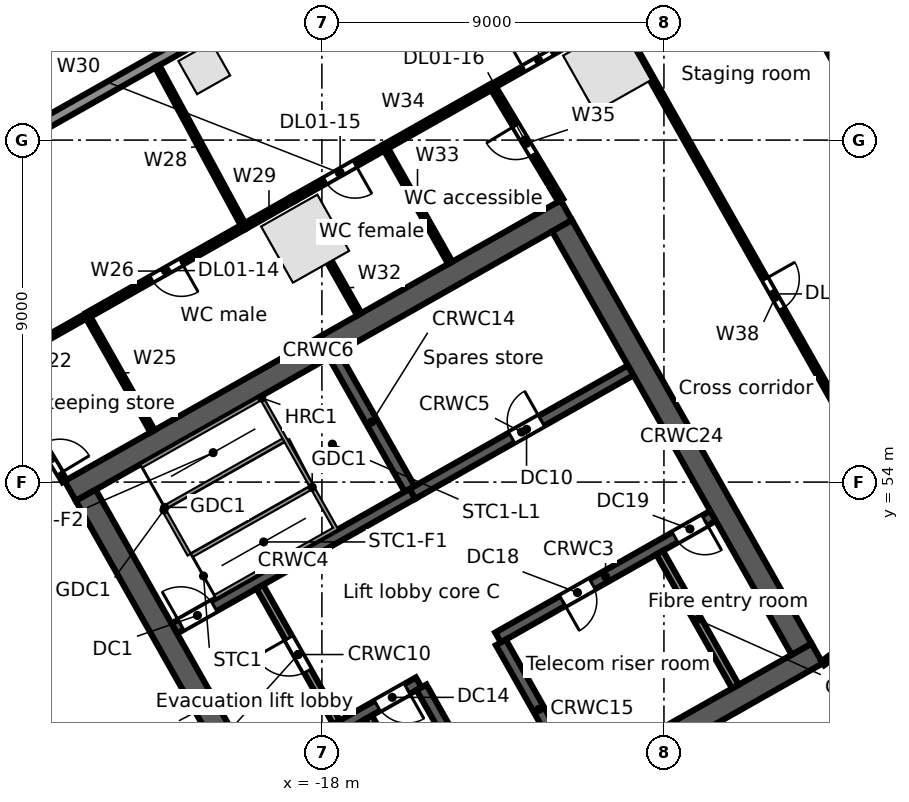
"""IFC4 building model, lengths in metres.
Left out: names, types, materials, properties, quantities, classifications, styles, units other than length and angle.
Written with IfcOpenShell. Run it as: python <this file> out.ifc"""

import sys

from ifc_helpers import new_model, si_unit, direction, frame, frame_2d, origin, origin_2d, place, context, subcontext, project, spatial, rectangle, extrude, element, fill, save


model = new_model("IFC4")
c1 = context("Model", 3, precision=1e-05, world=origin(), true_north=direction((0.0, 1.0)))
c2 = subcontext(c1, "Body", "Model", "MODEL_VIEW")
j1 = project(units=[si_unit("LENGTHUNIT", "METRE"), si_unit("PLANEANGLEUNIT", "RADIAN")], contexts=[c1])
p1 = place(None, origin())
s1 = spatial("IfcSite", under=j1, at=p1, CompositionType="ELEMENT")
p2 = place(p1, origin())
s2 = spatial("IfcBuilding", under=s1, at=p2, CompositionType="ELEMENT")
p3 = place(p2, frame((0.0, 0.0, 6.5)))
s3 = spatial("IfcBuildingStorey", under=s2, at=p3, CompositionType="ELEMENT", Elevation=6.5)
for number, where, z_axis, x_axis in (
    (1, (-10.495, 64.902, 0.0), (0.0, 0.0, 1.0), (-0.87, -0.492, 0.0)),
    (2, (-18.441, 60.406, 0.0), (0.0, 0.0, 1.0), (-0.87, -0.492, 0.0)),
):
    element("IfcColumn", number, at=place(p3, frame(where, z_axis=z_axis, x_axis=x_axis)), inside=s3, PredefinedType="COLUMN", context=c2, shape_type="SweptSolid", body=[
        extrude(rectangle(XDim=1.7, YDim=1.7, at=origin_2d()), origin(), (0.0, 0.0, 1.0), 5.0),
    ])
p4 = place(p3, frame((-21.096, 64.89, 0.0), z_axis=(0.0, 0.0, 1.0), x_axis=(-0.87035569594, -0.492423560103, 0.0)))
e3 = element("IfcColumn", 3, at=p4, inside=s3, PredefinedType="COLUMN", context=c2, shape_type="SweptSolid", body=[
    extrude(rectangle(XDim=1.0, YDim=1.0, at=origin_2d()), origin(), (0.0, 0.0, 1.0), 5.0),
])
p5 = place(p3, frame((-63.707, 41.701, 0.0), z_axis=(0.0, 0.0, 1.0), x_axis=(0.870355510268, 0.492423888277, 0.0)))
e4 = element("IfcWall", 4, at=p5, inside=s3, PredefinedType="STANDARD", context=c2, shape_type="SweptSolid", body=[
    extrude(rectangle(XDim=67.903, YDim=0.3, at=frame_2d((33.952, 0.0))), origin(), (0.0, 0.0, 1.0), 4.65),
])
p6 = place(p3, frame((-18.024, 42.104, 0.0), z_axis=(0.0, 0.0, 1.0), x_axis=(0.870360574057, 0.492414937962, 0.0)))
e5 = element("IfcWall", 5, at=p6, inside=s3, PredefinedType="SOLIDWALL", context=c2, shape_type="SweptSolid", body=[
    extrude(rectangle(XDim=15.0, YDim=0.6, at=frame_2d((7.5, 0.0))), origin(), (0.0, 0.0, 1.0), 4.65),
])
p7 = place(p6, frame((6.1, 0.0, 0.0)))
e6 = element("IfcOpeningElement", 6, at=p7, cuts=e5, PredefinedType="OPENING", context=c2, shape_type="SweptSolid", body=[
    extrude(rectangle(XDim=1.2, YDim=2.1, at=frame_2d((0.6, 1.05))), frame((0.0, 0.31, 0.0), z_axis=(0.0, -1.0, 0.0), x_axis=(1.0, 0.0, 0.0)), (0.0, 0.0, 1.0), 0.62),
])
p8 = place(p3, frame((-19.718, 46.316, 0.0), z_axis=(0.0, 0.0, 1.0), x_axis=(0.870353963862, 0.492426621528, 0.0)))
e7 = element("IfcWall", 7, at=p8, inside=s3, PredefinedType="SOLIDWALL", context=c2, shape_type="SweptSolid", body=[
    extrude(rectangle(XDim=4.9, YDim=0.3, at=frame_2d((2.45, 0.0))), origin(), (0.0, 0.0, 1.0), 4.65),
])
p9 = place(p8, frame((0.55, 0.0, 0.0)))
e8 = element("IfcOpeningElement", 8, at=p9, cuts=e7, PredefinedType="OPENING", context=c2, shape_type="SweptSolid", body=[
    extrude(rectangle(XDim=1.1, YDim=2.1, at=frame_2d((0.55, 1.05))), frame((0.0, 0.16, 0.0), z_axis=(0.0, -1.0, 0.0), x_axis=(1.0, 0.0, 0.0)), (0.0, 0.0, 1.0), 0.32),
])
p10 = place(p8, frame((3.65, 0.0, 0.0)))
e9 = element("IfcOpeningElement", 9, at=p10, cuts=e7, PredefinedType="OPENING", context=c2, shape_type="SweptSolid", body=[
    extrude(rectangle(XDim=0.9, YDim=2.1, at=frame_2d((0.45, 1.05))), frame((0.0, 0.16, 0.0), z_axis=(0.0, -1.0, 0.0), x_axis=(1.0, 0.0, 0.0)), (0.0, 0.0, 1.0), 0.32),
])
p11 = place(p3, frame((-13.365, 49.911, 0.0), z_axis=(0.0, 0.0, 1.0), x_axis=(0.870340995471, 0.49244954219, 0.0)))
e10 = element("IfcWall", 10, at=p11, inside=s3, PredefinedType="SOLIDWALL", context=c2, shape_type="SweptSolid", body=[
    extrude(rectangle(XDim=6.5, YDim=0.3, at=frame_2d((3.25, 0.0))), origin(), (0.0, 0.0, 1.0), 4.65),
])
p12 = place(p11, frame((1.95, 0.0, 0.0)))
e11 = element("IfcOpeningElement", 11, at=p12, cuts=e10, PredefinedType="OPENING", context=c2, shape_type="SweptSolid", body=[
    extrude(rectangle(XDim=0.9, YDim=2.1, at=frame_2d((0.45, 1.05))), frame((0.0, 0.16, 0.0), z_axis=(0.0, -1.0, 0.0), x_axis=(1.0, 0.0, 0.0)), (0.0, 0.0, 1.0), 0.32),
])
p13 = place(p11, frame((5.35, 0.0, 0.0)))
e12 = element("IfcOpeningElement", 12, at=p13, cuts=e10, PredefinedType="OPENING", context=c2, shape_type="SweptSolid", body=[
    extrude(rectangle(XDim=0.9, YDim=2.1, at=frame_2d((0.45, 1.05))), frame((0.0, 0.16, 0.0), z_axis=(0.0, -1.0, 0.0), x_axis=(1.0, 0.0, 0.0)), (0.0, 0.0, 1.0), 0.32),
])
p14 = place(p3, frame((-21.885, 50.146, 0.0), z_axis=(0.0, 0.0, 1.0), x_axis=(0.870359411463, 0.492416992881, 0.0)))
e13 = element("IfcWall", 13, at=p14, inside=s3, PredefinedType="SOLIDWALL", context=c2, shape_type="SweptSolid", body=[
    extrude(rectangle(XDim=7.2, YDim=0.3, at=frame_2d((3.6, 0.0))), origin(), (0.0, 0.0, 1.0), 4.65),
])
p15 = place(p14, frame((0.2, 0.0, 0.0)))
e14 = element("IfcOpeningElement", 14, at=p15, cuts=e13, PredefinedType="OPENING", context=c2, shape_type="SweptSolid", body=[
    extrude(rectangle(XDim=1.0, YDim=2.1, at=frame_2d((0.5, 1.05))), frame((0.0, 0.16, 0.0), z_axis=(0.0, -1.0, 0.0), x_axis=(1.0, 0.0, 0.0)), (0.0, 0.0, 1.0), 0.32),
])
p16 = place(p3, frame((-15.618, 53.691, 0.0), z_axis=(0.0, 0.0, 1.0), x_axis=(0.870356769198, 0.492421663121, 0.0)))
e15 = element("IfcWall", 15, at=p16, inside=s3, PredefinedType="SOLIDWALL", context=c2, shape_type="SweptSolid", body=[
    extrude(rectangle(XDim=6.6, YDim=0.3, at=frame_2d((3.3, 0.0))), origin(), (0.0, 0.0, 1.0), 4.65),
])
p17 = place(p16, frame((3.0, 0.0, 0.0)))
e16 = element("IfcOpeningElement", 16, at=p17, cuts=e15, PredefinedType="OPENING", context=c2, shape_type="SweptSolid", body=[
    extrude(rectangle(XDim=0.9, YDim=2.1, at=frame_2d((0.45, 1.05))), frame((0.0, 0.16, 0.0), z_axis=(0.0, -1.0, 0.0), x_axis=(1.0, 0.0, 0.0)), (0.0, 0.0, 1.0), 0.32),
])
p18 = place(p3, frame((-24.623, 53.767, 0.0), z_axis=(0.0, 0.0, 1.0), x_axis=(0.870356627484, 0.492421913601, 0.0)))
e17 = element("IfcWall", 17, at=p18, inside=s3, PredefinedType="SOLIDWALL", context=c2, shape_type="SweptSolid", body=[
    extrude(rectangle(XDim=15.0, YDim=0.6, at=frame_2d((7.5, 0.0))), origin(), (0.0, 0.0, 1.0), 4.65),
])
p19 = place(p3, frame((-24.214, 53.654, 0.0), z_axis=(0.0, 0.0, 1.0), x_axis=(0.492441221355, -0.870345703448, 0.0)))
e18 = element("IfcWall", 18, at=p19, inside=s3, PredefinedType="SOLIDWALL", context=c2, shape_type="SweptSolid", body=[
    extrude(rectangle(XDim=12.8, YDim=0.6, at=frame_2d((6.4, 0.0))), origin(), (0.0, 0.0, 1.0), 4.65),
])
p20 = place(p3, frame((-19.635, 51.246, 0.0), z_axis=(0.0, 0.0, 1.0), x_axis=(0.492408451753, -0.87036424366, 0.0)))
e19 = element("IfcWall", 19, at=p20, inside=s3, PredefinedType="PARTITIONING", context=c2, shape_type="SweptSolid", body=[
    extrude(rectangle(XDim=4.1, YDim=0.2, at=frame_2d((2.05, 0.0))), origin(), (0.0, 0.0, 1.0), 4.65),
])
p21 = place(p20, frame((1.55, 0.0, 0.0)))
e20 = element("IfcOpeningElement", 20, at=p21, cuts=e19, PredefinedType="OPENING", context=c2, shape_type="SweptSolid", body=[
    extrude(rectangle(XDim=1.0, YDim=2.1, at=frame_2d((0.5, 1.05))), frame((0.0, 0.11, 0.0), z_axis=(0.0, -1.0, 0.0), x_axis=(1.0, 0.0, 0.0)), (0.0, 0.0, 1.0), 0.22),
])
p22 = place(p3, frame((-16.772, 47.811, 0.0), z_axis=(0.0, 0.0, 1.0), x_axis=(0.492440575896, -0.870346068648, 0.0)))
e21 = element("IfcWall", 21, at=p22, inside=s3, PredefinedType="SOLIDWALL", context=c2, shape_type="SweptSolid", body=[
    extrude(rectangle(XDim=4.05, YDim=0.2, at=frame_2d((2.025, 0.0))), origin(), (0.0, 0.0, 1.0), 4.65),
])
p23 = place(p3, frame((-15.379, 48.599, 0.0), z_axis=(0.0, 0.0, 1.0), x_axis=(0.492394910396, -0.870371904542, 0.0)))
e22 = element("IfcWall", 22, at=p23, inside=s3, PredefinedType="SOLIDWALL", context=c2, shape_type="SweptSolid", body=[
    extrude(rectangle(XDim=4.05, YDim=0.3, at=frame_2d((2.025, 0.0))), origin(), (0.0, 0.0, 1.0), 4.65),
])
p24 = place(p3, frame((-17.686, 57.347, 0.0), z_axis=(0.0, 0.0, 1.0), x_axis=(0.492420746998, -0.870357287513, 0.0)))
e23 = element("IfcWall", 23, at=p24, inside=s3, PredefinedType="SOLIDWALL", context=c2, shape_type="SweptSolid", body=[
    extrude(rectangle(XDim=4.05, YDim=0.3, at=frame_2d((2.025, 0.0))), origin(), (0.0, 0.0, 1.0), 4.65),
])
p25 = place(p3, frame((-13.291, 49.781, 0.0), z_axis=(0.0, 0.0, 1.0), x_axis=(0.492394910396, -0.870371904542, 0.0)))
e24 = element("IfcWall", 24, at=p25, inside=s3, PredefinedType="SOLIDWALL", context=c2, shape_type="SweptSolid", body=[
    extrude(rectangle(XDim=4.05, YDim=0.3, at=frame_2d((2.025, 0.0))), origin(), (0.0, 0.0, 1.0), 4.65),
])
p26 = place(p3, frame((-9.113, 52.144, 0.0), z_axis=(0.0, 0.0, 1.0), x_axis=(0.492394910396, -0.870371904542, 0.0)))
e25 = element("IfcWall", 25, at=p26, inside=s3, PredefinedType="PARTITIONING", context=c2, shape_type="SweptSolid", body=[
    extrude(rectangle(XDim=4.05, YDim=0.2, at=frame_2d((2.025, 0.0))), origin(), (0.0, 0.0, 1.0), 4.65),
])
p27 = place(p3, frame((-11.681, 60.744, 0.0), z_axis=(0.0, 0.0, 1.0), x_axis=(0.492426772896, -0.870353878221, 0.0)))
e26 = element("IfcWall", 26, at=p27, inside=s3, PredefinedType="SOLIDWALL", context=c2, shape_type="SweptSolid", body=[
    extrude(rectangle(XDim=12.8, YDim=0.6, at=frame_2d((6.4, 0.0))), origin(), (0.0, 0.0, 1.0), 4.65),
])
p28 = place(p3, frame((-26.573, 57.03, 0.0), z_axis=(0.0, 0.0, 1.0), x_axis=(0.870344460795, 0.492443417626, 0.0)))
e27 = element("IfcWall", 27, at=p28, inside=s3, PredefinedType="PARTITIONING", context=c2, shape_type="SweptSolid", body=[
    extrude(rectangle(XDim=2.75, YDim=0.125, at=frame_2d((1.375, 0.0))), origin(), (0.0, 0.0, 1.0), 4.65),
])
p29 = place(p3, frame((-25.587, 55.387, 0.0), z_axis=(0.0, 0.0, 1.0), x_axis=(0.514767546849, -0.857329792268, 0.0)))
e28 = element("IfcWall", 28, at=p29, inside=s3, PredefinedType="PARTITIONING", context=c2, shape_type="SweptSolid", body=[
    extrude(rectangle(XDim=1.585, YDim=0.125, at=frame_2d((0.792, 0.0))), origin(), (0.0, 0.0, 1.0), 4.65),
])
p30 = place(p29, frame((0.45, 0.0, 0.0)))
e29 = element("IfcOpeningElement", 29, at=p30, cuts=e28, PredefinedType="OPENING", context=c2, shape_type="SweptSolid", body=[
    extrude(rectangle(XDim=0.9, YDim=2.1, at=frame_2d((0.45, 1.05))), frame((0.0, 0.073, 0.0), z_axis=(0.0, -1.0, 0.0), x_axis=(1.0, 0.0, 0.0)), (0.0, 0.0, 1.0), 0.145),
])
p31 = place(p3, frame((-24.18, 58.384, 0.0), z_axis=(0.0, 0.0, 1.0), x_axis=(0.492521469645, -0.870300294116, 0.0)))
e30 = element("IfcWall", 30, at=p31, inside=s3, PredefinedType="PARTITIONING", context=c2, shape_type="SweptSolid", body=[
    extrude(rectangle(XDim=3.5, YDim=0.125, at=frame_2d((1.75, 0.0))), origin(), (0.0, 0.0, 1.0), 3.93),
])
p32 = place(p3, frame((-24.18, 58.384, 0.0), z_axis=(0.0, 0.0, 1.0), x_axis=(0.870360772617, 0.492414587, 0.0)))
e31 = element("IfcWall", 31, at=p32, inside=s3, PredefinedType="PARTITIONING", context=c2, shape_type="SweptSolid", body=[
    extrude(rectangle(XDim=4.75, YDim=0.15, at=frame_2d((2.375, 0.0))), origin(), (0.0, 0.0, 1.0), 4.65),
])
p33 = place(p32, frame((1.95, 0.0, 0.0)))
e32 = element("IfcOpeningElement", 32, at=p33, cuts=e31, PredefinedType="OPENING", context=c2, shape_type="SweptSolid", body=[
    extrude(rectangle(XDim=0.9, YDim=2.1, at=frame_2d((0.45, 1.05))), frame((0.0, 0.085, 0.0), z_axis=(0.0, -1.0, 0.0), x_axis=(1.0, 0.0, 0.0)), (0.0, 0.0, 1.0), 0.17),
])
p34 = place(p3, frame((-22.33, 64.939, 0.0), z_axis=(0.0, 0.0, 1.0), x_axis=(0.476360236723, -0.879250206067, 0.0)))
e33 = element("IfcWall", 33, at=p34, inside=s3, PredefinedType="PARTITIONING", context=c2, shape_type="SweptSolid", body=[
    extrude(rectangle(XDim=4.795, YDim=0.125, at=frame_2d((2.397, 0.0))), origin(), (0.0, 0.0, 1.0), 3.93),
])
p35 = place(p3, frame((-20.046, 60.723, 0.0), z_axis=(0.0, 0.0, 1.0), x_axis=(0.870308175411, 0.492507542899, 0.0)))
e34 = element("IfcWall", 34, at=p35, inside=s3, PredefinedType="PARTITIONING", context=c2, shape_type="SweptSolid", body=[
    extrude(rectangle(XDim=1.5, YDim=0.15, at=frame_2d((0.75, 0.0))), origin(), (0.0, 0.0, 1.0), 3.93),
])
p36 = place(p3, frame((-18.74, 61.462, 0.0), z_axis=(0.0, 0.0, 1.0), x_axis=(0.870430549821, 0.492291232848, 0.0)))
e35 = element("IfcWall", 35, at=p36, inside=s3, PredefinedType="PARTITIONING", context=c2, shape_type="SweptSolid", body=[
    extrude(rectangle(XDim=2.75, YDim=0.15, at=frame_2d((1.375, 0.0))), origin(), (0.0, 0.0, 1.0), 4.65),
])
p37 = place(p36, frame((0.95, 0.0, 0.0)))
e36 = element("IfcOpeningElement", 36, at=p37, cuts=e35, PredefinedType="OPENING", context=c2, shape_type="SweptSolid", body=[
    extrude(rectangle(XDim=0.9, YDim=2.1, at=frame_2d((0.45, 1.05))), frame((0.0, 0.085, 0.0), z_axis=(0.0, -1.0, 0.0), x_axis=(1.0, 0.0, 0.0)), (0.0, 0.0, 1.0), 0.17),
])
p38 = place(p3, frame((-17.797, 59.794, 0.0), z_axis=(0.0, 0.0, 1.0), x_axis=(0.492366981934, -0.870387703901, 0.0)))
e37 = element("IfcWall", 37, at=p38, inside=s3, PredefinedType="PARTITIONING", context=c2, shape_type="SweptSolid", body=[
    extrude(rectangle(XDim=1.584, YDim=0.125, at=frame_2d((0.792, 0.0))), origin(), (0.0, 0.0, 1.0), 4.65),
])
p39 = place(p3, frame((-16.346, 62.816, 0.0), z_axis=(0.0, 0.0, 1.0), x_axis=(0.492220429283, -0.870470590541, 0.0)))
e38 = element("IfcWall", 38, at=p39, inside=s3, PredefinedType="PARTITIONING", context=c2, shape_type="SweptSolid", body=[
    extrude(rectangle(XDim=3.5, YDim=0.125, at=frame_2d((1.75, 0.0))), origin(), (0.0, 0.0, 1.0), 3.93),
])
p40 = place(p3, frame((-16.346, 62.816, 0.0), z_axis=(0.0, 0.0, 1.0), x_axis=(0.870334637055, 0.492460779699, 0.0)))
e39 = element("IfcWall", 39, at=p40, inside=s3, PredefinedType="PARTITIONING", context=c2, shape_type="SweptSolid", body=[
    extrude(rectangle(XDim=3.249, YDim=0.15, at=frame_2d((1.625, 0.0))), origin(), (0.0, 0.0, 1.0), 4.65),
])
p41 = place(p3, frame((-13.518, 64.416, 0.0), z_axis=(0.0, 0.0, 1.0), x_axis=(0.514875058642, -0.857265229663, 0.0)))
e40 = element("IfcWall", 40, at=p41, inside=s3, PredefinedType="PARTITIONING", context=c2, shape_type="SweptSolid", body=[
    extrude(rectangle(XDim=3.502, YDim=0.15, at=frame_2d((1.751, 0.0))), origin(), (0.0, 0.0, 1.0), 3.93),
])
p42 = place(p41, frame((1.2, 0.0, 0.0)))
e41 = element("IfcOpeningElement", 41, at=p42, cuts=e40, PredefinedType="OPENING", context=c2, shape_type="SweptSolid", body=[
    extrude(rectangle(XDim=0.9, YDim=2.1, at=frame_2d((0.45, 1.05))), frame((0.0, 0.085, 0.0), z_axis=(0.0, -1.0, 0.0), x_axis=(1.0, 0.0, 0.0)), (0.0, 0.0, 1.0), 0.17),
])
p43 = place(p3, frame((-13.518, 64.416, 0.0), z_axis=(0.0, 0.0, 1.0), x_axis=(0.870338454914, 0.492454032268, 0.0)))
e42 = element("IfcWall", 42, at=p43, inside=s3, PredefinedType="PARTITIONING", context=c2, shape_type="SweptSolid", body=[
    extrude(rectangle(XDim=3.75, YDim=0.125, at=frame_2d((1.875, 0.0))), origin(), (0.0, 0.0, 1.0), 3.712),
])
p44 = place(p43, frame((0.95, 0.0, 0.0)))
e43 = element("IfcOpeningElement", 43, at=p44, cuts=e42, PredefinedType="OPENING", context=c2, shape_type="SweptSolid", body=[
    extrude(rectangle(XDim=0.9, YDim=2.1, at=frame_2d((0.45, 1.05))), frame((0.0, 0.073, 0.0), z_axis=(0.0, -1.0, 0.0), x_axis=(1.0, 0.0, 0.0)), (0.0, 0.0, 1.0), 0.145),
])
p45 = place(p3, frame((-10.254, 66.263, 0.0), z_axis=(0.0, 0.0, 1.0), x_axis=(0.492411664329, -0.870362426138, 0.0)))
e44 = element("IfcWall", 44, at=p45, inside=s3, PredefinedType="PARTITIONING", context=c2, shape_type="SweptSolid", body=[
    extrude(rectangle(XDim=17.0, YDim=0.125, at=frame_2d((8.5, 0.0))), origin(), (0.0, 0.0, 1.0), 3.712),
])
p46 = place(p45, frame((7.95, 0.0, 0.0)))
e45 = element("IfcOpeningElement", 45, at=p46, cuts=e44, PredefinedType="OPENING", context=c2, shape_type="SweptSolid", body=[
    extrude(rectangle(XDim=0.9, YDim=2.1, at=frame_2d((0.45, 1.05))), frame((0.0, 0.073, 0.0), z_axis=(0.0, -1.0, 0.0), x_axis=(1.0, 0.0, 0.0)), (0.0, 0.0, 1.0), 0.145),
])
p47 = place(p3, frame((-6.337, 68.478, 0.0), z_axis=(0.0, 0.0, 1.0), x_axis=(0.483322867171, -0.875442177456, 0.0)))
e46 = element("IfcWall", 46, at=p47, inside=s3, PredefinedType="PARTITIONING", context=c2, shape_type="SweptSolid", body=[
    extrude(rectangle(XDim=9.594, YDim=0.2, at=frame_2d((4.797, 0.0))), origin(), (0.0, 0.0, 1.0), 3.712),
])
p48 = place(p3, frame((-4.821, 49.23, 0.0), z_axis=(0.0, 0.0, 1.0), x_axis=(0.795615322848, 0.605802160816, 0.0)))
e47 = element("IfcWall", 47, at=p48, inside=s3, PredefinedType="PARTITIONING", context=c2, shape_type="SweptSolid", body=[
    extrude(rectangle(XDim=3.693, YDim=0.125, at=frame_2d((1.846, 0.0))), origin(), (0.0, 0.0, 1.0), 4.65),
])
p49 = place(p48, frame((1.45, 0.0, 0.0)))
e48 = element("IfcOpeningElement", 48, at=p49, cuts=e47, PredefinedType="OPENING", context=c2, shape_type="SweptSolid", body=[
    extrude(rectangle(XDim=0.9, YDim=2.1, at=frame_2d((0.45, 1.05))), frame((0.0, 0.073, 0.0), z_axis=(0.0, -1.0, 0.0), x_axis=(1.0, 0.0, 0.0)), (0.0, 0.0, 1.0), 0.145),
])
p50 = place(p15, origin())
e49 = element("IfcDoor", 49, at=p50, inside=s3, OperationType="SINGLE_SWING_LEFT", PredefinedType="DOOR", context=c2, shape_type="SweptSolid", body=[
    extrude(rectangle(XDim=1.0, YDim=2.1, at=frame_2d((0.5, 1.05))), frame((0.0, 0.025, 0.0), z_axis=(0.0, -1.0, 0.0), x_axis=(1.0, 0.0, 0.0)), (0.0, 0.0, 1.0), 0.05),
])
fill(e14, e49)
p51 = place(p21, frame((1.0, 0.0, 0.0), z_axis=(0.0, 0.0, 1.0), x_axis=(-1.0, 0.0, 0.0)))
e50 = element("IfcDoor", 50, at=p51, inside=s3, OperationType="SINGLE_SWING_RIGHT", PredefinedType="DOOR", context=c2, shape_type="SweptSolid", body=[
    extrude(rectangle(XDim=1.0, YDim=2.1, at=frame_2d((0.5, 1.05))), frame((0.0, 0.025, 0.0), z_axis=(0.0, -1.0, 0.0), x_axis=(1.0, 0.0, 0.0)), (0.0, 0.0, 1.0), 0.05),
])
fill(e20, e50)
p52 = place(p17, origin())
e51 = element("IfcDoor", 51, at=p52, inside=s3, OperationType="SINGLE_SWING_RIGHT", PredefinedType="DOOR", context=c2, shape_type="SweptSolid", body=[
    extrude(rectangle(XDim=0.9, YDim=2.1, at=frame_2d((0.45, 1.05))), frame((0.0, 0.025, 0.0), z_axis=(0.0, -1.0, 0.0), x_axis=(1.0, 0.0, 0.0)), (0.0, 0.0, 1.0), 0.05),
])
fill(e16, e51)
p53 = place(p10, frame((0.9, 0.0, 0.0), z_axis=(0.0, 0.0, 1.0), x_axis=(-1.0, 0.0, 0.0)))
e52 = element("IfcDoor", 52, at=p53, inside=s3, OperationType="SINGLE_SWING_LEFT", PredefinedType="DOOR", context=c2, shape_type="SweptSolid", body=[
    extrude(rectangle(XDim=0.9, YDim=2.1, at=frame_2d((0.45, 1.05))), frame((0.0, 0.025, 0.0), z_axis=(0.0, -1.0, 0.0), x_axis=(1.0, 0.0, 0.0)), (0.0, 0.0, 1.0), 0.05),
])
fill(e9, e52)
p54 = place(p12, frame((0.9, 0.0, 0.0), z_axis=(0.0, 0.0, 1.0), x_axis=(-1.0, 0.0, 0.0)))
e53 = element("IfcDoor", 53, at=p54, inside=s3, OperationType="SINGLE_SWING_RIGHT", PredefinedType="DOOR", context=c2, shape_type="SweptSolid", body=[
    extrude(rectangle(XDim=0.9, YDim=2.1, at=frame_2d((0.45, 1.05))), frame((0.0, 0.025, 0.0), z_axis=(0.0, -1.0, 0.0), x_axis=(1.0, 0.0, 0.0)), (0.0, 0.0, 1.0), 0.05),
])
fill(e11, e53)
p55 = place(p13, frame((0.9, 0.0, 0.0), z_axis=(0.0, 0.0, 1.0), x_axis=(-1.0, 0.0, 0.0)))
e54 = element("IfcDoor", 54, at=p55, inside=s3, OperationType="SINGLE_SWING_LEFT", PredefinedType="DOOR", context=c2, shape_type="SweptSolid", body=[
    extrude(rectangle(XDim=0.9, YDim=2.1, at=frame_2d((0.45, 1.05))), frame((0.0, 0.025, 0.0), z_axis=(0.0, -1.0, 0.0), x_axis=(1.0, 0.0, 0.0)), (0.0, 0.0, 1.0), 0.05),
])
fill(e12, e54)
p56 = place(p44, origin())
e55 = element("IfcDoor", 55, at=p56, inside=s3, OperationType="SINGLE_SWING_LEFT", PredefinedType="DOOR", context=c2, shape_type="SweptSolid", body=[
    extrude(rectangle(XDim=0.9, YDim=2.1, at=frame_2d((0.45, 1.05))), frame((0.0, 0.025, 0.0), z_axis=(0.0, -1.0, 0.0), x_axis=(1.0, 0.0, 0.0)), (0.0, 0.0, 1.0), 0.05),
])
fill(e43, e55)
p57 = place(p46, origin())
e56 = element("IfcDoor", 56, at=p57, inside=s3, OperationType="SINGLE_SWING_LEFT", PredefinedType="DOOR", context=c2, shape_type="SweptSolid", body=[
    extrude(rectangle(XDim=0.9, YDim=2.1, at=frame_2d((0.45, 1.05))), frame((0.0, 0.025, 0.0), z_axis=(0.0, -1.0, 0.0), x_axis=(1.0, 0.0, 0.0)), (0.0, 0.0, 1.0), 0.05),
])
fill(e45, e56)
p58 = place(p30, origin())
e57 = element("IfcDoor", 57, at=p58, inside=s3, OperationType="SINGLE_SWING_RIGHT", PredefinedType="DOOR", context=c2, shape_type="SweptSolid", body=[
    extrude(rectangle(XDim=0.9, YDim=2.1, at=frame_2d((0.45, 1.05))), frame((0.0, 0.025, 0.0), z_axis=(0.0, -1.0, 0.0), x_axis=(1.0, 0.0, 0.0)), (0.0, 0.0, 1.0), 0.05),
])
fill(e29, e57)
p59 = place(p33, frame((0.9, 0.0, 0.0), z_axis=(0.0, 0.0, 1.0), x_axis=(-1.0, 0.0, 0.0)))
e58 = element("IfcDoor", 58, at=p59, inside=s3, OperationType="SINGLE_SWING_LEFT", PredefinedType="DOOR", context=c2, shape_type="SweptSolid", body=[
    extrude(rectangle(XDim=0.9, YDim=2.1, at=frame_2d((0.45, 1.05))), frame((0.0, 0.025, 0.0), z_axis=(0.0, -1.0, 0.0), x_axis=(1.0, 0.0, 0.0)), (0.0, 0.0, 1.0), 0.05),
])
fill(e32, e58)
p60 = place(p37, frame((0.9, 0.0, 0.0), z_axis=(0.0, 0.0, 1.0), x_axis=(-1.0, 0.0, 0.0)))
e59 = element("IfcDoor", 59, at=p60, inside=s3, OperationType="SINGLE_SWING_LEFT", PredefinedType="DOOR", context=c2, shape_type="SweptSolid", body=[
    extrude(rectangle(XDim=0.9, YDim=2.1, at=frame_2d((0.45, 1.05))), frame((0.0, 0.025, 0.0), z_axis=(0.0, -1.0, 0.0), x_axis=(1.0, 0.0, 0.0)), (0.0, 0.0, 1.0), 0.05),
])
fill(e36, e59)
p61 = place(p42, frame((0.9, 0.0, 0.0), z_axis=(0.0, 0.0, 1.0), x_axis=(-1.0, 0.0, 0.0)))
e60 = element("IfcDoor", 60, at=p61, inside=s3, OperationType="SINGLE_SWING_RIGHT", PredefinedType="DOOR", context=c2, shape_type="SweptSolid", body=[
    extrude(rectangle(XDim=0.9, YDim=2.1, at=frame_2d((0.45, 1.05))), frame((0.0, 0.025, 0.0), z_axis=(0.0, -1.0, 0.0), x_axis=(1.0, 0.0, 0.0)), (0.0, 0.0, 1.0), 0.05),
])
fill(e41, e60)
save(model, sys.argv[1])
